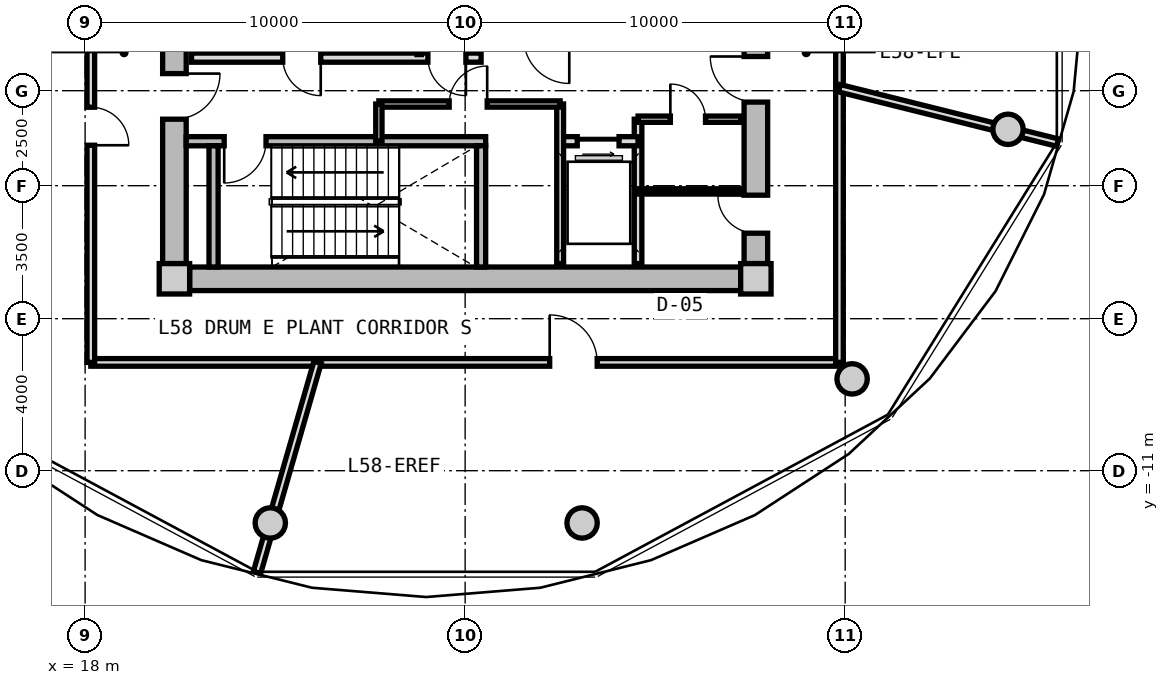
"""IFC4 building model, lengths in metres.
Left out: names, types, materials, properties, quantities, classifications, styles, units other than length and angle.
Written with IfcOpenShell. Run it as: python <this file> out.ifc"""

import sys

from ifc_helpers import new_model, si_unit, direction, frame, frame_2d, origin, origin_2d, place, context, subcontext, project, spatial, rectangle, circle, extrude, source, transform, mapped, element, fill, save


model = new_model("IFC4")
c1 = context("Model", 3, precision=1e-05, world=origin(), true_north=direction((0.0, 1.0)))
c2 = subcontext(c1, "Body", "Model", "MODEL_VIEW")
j1 = project(units=[si_unit("LENGTHUNIT", "METRE"), si_unit("PLANEANGLEUNIT", "RADIAN")], contexts=[c1])
p1 = place(None, origin())
s1 = spatial("IfcSite", under=j1, at=p1, CompositionType="ELEMENT")
p2 = place(p1, origin())
s2 = spatial("IfcBuilding", under=s1, at=p2, CompositionType="ELEMENT")
p3 = place(p2, frame((0.0, 0.0, 186.15)))
s3 = spatial("IfcBuildingStorey", under=s2, at=p3, CompositionType="ELEMENT", Elevation=186.15)
m1 = source(origin(), c2, "Body", "SweptSolid", [
    extrude(rectangle(XDim=0.8, YDim=0.8, at=origin_2d()), origin(), (0.0, 0.0, 1.0), 4.5),
])
for number, where, z_axis, x_axis in (
    (1, (20.35, -5.95, 0.0), (0.0, 0.0, 1.0), (1.0, 0.0, 0.0)),
    (2, (35.65, -5.95, 0.0), (0.0, 0.0, 1.0), (1.0, 0.0, 0.0)),
):
    element("IfcColumn", number, at=place(p3, frame(where, z_axis=z_axis, x_axis=x_axis)), inside=s3, PredefinedType="COLUMN", context=c2, shape_type="MappedRepresentation", body=[
        mapped(m1, transform((0.0, 0.0, 0.0), x_axis=(1.0, 0.0, 0.0), y_axis=(0.0, 1.0, 0.0), z_axis=(0.0, 0.0, 1.0), scale=1.0)),
    ])
m2 = source(origin(), c2, "Body", "SweptSolid", [
    extrude(rectangle(XDim=14.5, YDim=0.62, at=frame_2d((7.25, 0.0))), origin(), (0.0, 0.0, 1.0), 4.08),
])
p4 = place(p3, frame((35.25, -5.95, 0.0), z_axis=(0.0, 0.0, 1.0), x_axis=(-1.0, 0.0, 0.0)))
e3 = element("IfcWall", 3, at=p4, inside=s3, PredefinedType="SHEAR", context=c2, shape_type="MappedRepresentation", body=[
    mapped(m2, transform((0.0, 0.0, 0.0), x_axis=(1.0, 0.0, 0.0), y_axis=(0.0, 1.0, 0.0), z_axis=(0.0, 0.0, 1.0), scale=1.0)),
])
m3 = source(origin(), c2, "Body", "SweptSolid", [
    extrude(rectangle(XDim=11.1, YDim=0.62, at=frame_2d((5.55, 0.0))), origin(), (0.0, 0.0, 1.0), 4.08),
])
p5 = place(p3, frame((20.35, -5.55, 0.0), z_axis=(0.0, 0.0, 1.0), x_axis=(0.0, 1.0, 0.0)))
e4 = element("IfcWall", 4, at=p5, inside=s3, PredefinedType="SHEAR", context=c2, shape_type="MappedRepresentation", body=[
    mapped(m3, transform((0.0, 0.0, 0.0), x_axis=(1.0, 0.0, 0.0), y_axis=(0.0, 1.0, 0.0), z_axis=(0.0, 0.0, 1.0), scale=1.0)),
])
p6 = place(p5, frame((3.8, 0.0, 0.0)))
e5 = element("IfcOpeningElement", 5, at=p6, cuts=e4, PredefinedType="OPENING", context=c2, shape_type="SweptSolid", body=[
    extrude(rectangle(XDim=1.2, YDim=2.15, at=frame_2d((0.6, 1.075))), frame((0.0, 0.32, 0.0), z_axis=(0.0, -1.0, 0.0), x_axis=(1.0, 0.0, 0.0)), (0.0, 0.0, 1.0), 0.64),
])
p7 = place(p3, frame((35.65, 5.55, 0.0), z_axis=(0.0, 0.0, 1.0), x_axis=(0.0, -1.0, 0.0)))
e6 = element("IfcWall", 6, at=p7, inside=s3, PredefinedType="SHEAR", context=c2, shape_type="MappedRepresentation", body=[
    mapped(m3, transform((0.0, 0.0, 0.0), x_axis=(1.0, 0.0, 0.0), y_axis=(0.0, 1.0, 0.0), z_axis=(0.0, 0.0, 1.0), scale=1.0)),
])
p8 = place(p7, frame((5.65, 0.0, 0.0)))
e7 = element("IfcOpeningElement", 7, at=p8, cuts=e6, PredefinedType="OPENING", context=c2, shape_type="SweptSolid", body=[
    extrude(rectangle(XDim=1.2, YDim=2.15, at=frame_2d((0.6, 1.075))), frame((0.0, 0.32, 0.0), z_axis=(0.0, -1.0, 0.0), x_axis=(1.0, 0.0, 0.0)), (0.0, 0.0, 1.0), 0.64),
])
p9 = place(p7, frame((9.3, 0.0, 0.0)))
e8 = element("IfcOpeningElement", 8, at=p9, cuts=e6, PredefinedType="OPENING", context=c2, shape_type="SweptSolid", body=[
    extrude(rectangle(XDim=1.0, YDim=2.1, at=frame_2d((0.5, 1.05))), frame((0.0, 0.32, 0.0), z_axis=(0.0, -1.0, 0.0), x_axis=(1.0, 0.0, 0.0)), (0.0, 0.0, 1.0), 0.64),
])
m4 = source(origin(), c2, "Body", "SweptSolid", [
    extrude(circle(Radius=0.4, at=origin_2d()), origin(), (0.0, 0.0, 1.0), 4.08),
])
for number, where, z_axis, x_axis in (
    (9, (22.873, -12.375, 0.0), (0.0, 0.0, 1.0), (1.0, 0.0, 0.0)),
    (10, (31.077, -12.375, 0.0), (0.0, 0.0, 1.0), (1.0, 0.0, 0.0)),
    (11, (38.183, -8.584, 0.0), (0.0, 0.0, 1.0), (1.0, 0.0, 0.0)),
    (12, (42.285, -2.016, 0.0), (0.0, 0.0, 1.0), (1.0, 0.0, 0.0)),
):
    element("IfcColumn", number, at=place(p3, frame(where, z_axis=z_axis, x_axis=x_axis)), inside=s3, PredefinedType="COLUMN", context=c2, shape_type="MappedRepresentation", body=[
        mapped(m4, transform((0.0, 0.0, 0.0), x_axis=(1.0, 0.0, 0.0), y_axis=(0.0, 1.0, 0.0), z_axis=(0.0, 0.0, 1.0), scale=1.0)),
    ])
m5 = source(origin(), c2, "Body", "SweptSolid", [
    extrude(rectangle(XDim=7.88, YDim=0.24, at=frame_2d((3.94, 0.0))), origin(), (0.0, 0.0, 1.0), 4.08),
])
p10 = place(p3, frame((20.66, -2.33, 0.0), z_axis=(0.0, 0.0, 1.0), x_axis=(1.0, 0.0, 0.0)))
e13 = element("IfcWall", 13, at=p10, inside=s3, PredefinedType="PARTITIONING", context=c2, shape_type="MappedRepresentation", body=[
    mapped(m5, transform((0.0, 0.0, 0.0), x_axis=(1.0, 0.0, 0.0), y_axis=(0.0, 1.0, 0.0), z_axis=(0.0, 0.0, 1.0), scale=1.0)),
])
p11 = place(p10, frame((1.0, 0.0, 0.0)))
e14 = element("IfcOpeningElement", 14, at=p11, cuts=e13, PredefinedType="OPENING", context=c2, shape_type="SweptSolid", body=[
    extrude(rectangle(XDim=1.1, YDim=2.15, at=frame_2d((0.55, 1.075))), frame((0.0, 0.13, 0.0), z_axis=(0.0, -1.0, 0.0), x_axis=(1.0, 0.0, 0.0)), (0.0, 0.0, 1.0), 0.26),
])
m6 = source(origin(), c2, "Body", "SweptSolid", [
    extrude(rectangle(XDim=3.19, YDim=0.24, at=frame_2d((1.595, 0.0))), origin(), (0.0, 0.0, 1.0), 4.08),
])
for number, where, z_axis, x_axis in (
    (15, (21.38, -5.64, 0.0), (0.0, 0.0, 1.0), (0.0, 1.0, 0.0)),
    (16, (28.42, -5.64, 0.0), (0.0, 0.0, 1.0), (0.0, 1.0, 0.0)),
):
    element("IfcWall", number, at=place(p3, frame(where, z_axis=z_axis, x_axis=x_axis)), inside=s3, PredefinedType="PARTITIONING", context=c2, shape_type="MappedRepresentation", body=[
        mapped(m6, transform((0.0, 0.0, 0.0), x_axis=(1.0, 0.0, 0.0), y_axis=(0.0, 1.0, 0.0), z_axis=(0.0, 0.0, 1.0), scale=1.0)),
    ])
m7 = source(origin(), c2, "Body", "SweptSolid", [
    extrude(rectangle(XDim=7.62, YDim=0.24, at=frame_2d((3.81, 0.0))), origin(), (0.0, 0.0, 1.0), 4.065),
])
p12 = place(p3, frame((20.8, -0.13, 0.0), z_axis=(0.0, 0.0, 1.0), x_axis=(1.0, 0.0, 0.0)))
e17 = element("IfcWall", 17, at=p12, inside=s3, PredefinedType="PARTITIONING", context=c2, shape_type="MappedRepresentation", body=[
    mapped(m7, transform((0.0, 0.0, 0.0), x_axis=(1.0, 0.0, 0.0), y_axis=(0.0, 1.0, 0.0), z_axis=(0.0, 0.0, 1.0), scale=1.0)),
])
p13 = place(p12, frame((6.22, 0.0, 0.0)))
e18 = element("IfcOpeningElement", 18, at=p13, cuts=e17, PredefinedType="OPENING", context=c2, shape_type="SweptSolid", body=[
    extrude(rectangle(XDim=1.0, YDim=2.1, at=frame_2d((0.5, 1.05))), frame((0.0, 0.13, 0.0), z_axis=(0.0, -1.0, 0.0), x_axis=(1.0, 0.0, 0.0)), (0.0, 0.0, 1.0), 0.26),
])
p14 = place(p12, frame((2.4, 0.0, 0.0)))
e19 = element("IfcOpeningElement", 19, at=p14, cuts=e17, PredefinedType="OPENING", context=c2, shape_type="SweptSolid", body=[
    extrude(rectangle(XDim=1.0, YDim=2.1, at=frame_2d((0.5, 1.05))), frame((0.0, 0.13, 0.0), z_axis=(0.0, -1.0, 0.0), x_axis=(1.0, 0.0, 0.0)), (0.0, 0.0, 1.0), 0.26),
])
m8 = source(origin(), c2, "Body", "SweptSolid", [
    extrude(rectangle(XDim=2.33, YDim=0.115, at=frame_2d((1.165, 0.0))), origin(), (0.0, 0.0, 1.0), 4.065),
])
p15 = place(p3, frame((26.79, -0.05, 0.0), z_axis=(0.0, 0.0, 1.0), x_axis=(0.0, 1.0, 0.0)))
e20 = element("IfcWall", 20, at=p15, inside=s3, PredefinedType="PARTITIONING", context=c2, shape_type="MappedRepresentation", body=[
    mapped(m8, transform((0.0, 0.0, 0.0), x_axis=(1.0, 0.0, 0.0), y_axis=(0.0, 1.0, 0.0), z_axis=(0.0, 0.0, 1.0), scale=1.0)),
])
m9 = source(origin(), c2, "Body", "SweptSolid", [
    extrude(rectangle(XDim=3.8, YDim=0.2, at=frame_2d((1.9, 0.0))), origin(), (0.0, 0.0, 1.0), 4.065),
])
p16 = place(p3, frame((32.55, -5.55, 0.0), z_axis=(0.0, 0.0, 1.0), x_axis=(0.0, 1.0, 0.0)))
e21 = element("IfcWall", 21, at=p16, inside=s3, PredefinedType="PARTITIONING", context=c2, shape_type="MappedRepresentation", body=[
    mapped(m9, transform((0.0, 0.0, 0.0), x_axis=(1.0, 0.0, 0.0), y_axis=(0.0, 1.0, 0.0), z_axis=(0.0, 0.0, 1.0), scale=1.0)),
])
m10 = source(origin(), c2, "Body", "SweptSolid", [
    extrude(rectangle(XDim=2.05, YDim=0.24, at=frame_2d((1.025, 0.0))), origin(), (0.0, 0.0, 1.0), 4.065),
])
p17 = place(p3, frame((30.5, -2.33, 0.0), z_axis=(0.0, 0.0, 1.0), x_axis=(1.0, 0.0, 0.0)))
e22 = element("IfcWall", 22, at=p17, inside=s3, PredefinedType="PARTITIONING", context=c2, shape_type="MappedRepresentation", body=[
    mapped(m10, transform((0.0, 0.0, 0.0), x_axis=(1.0, 0.0, 0.0), y_axis=(0.0, 1.0, 0.0), z_axis=(0.0, 0.0, 1.0), scale=1.0)),
])
p18 = place(p17, frame((0.45, 0.0, 0.0)))
e23 = element("IfcOpeningElement", 23, at=p18, cuts=e22, PredefinedType="OPENING", context=c2, shape_type="SweptSolid", body=[
    extrude(rectangle(XDim=1.1, YDim=2.2, at=frame_2d((0.55, 1.1))), frame((0.0, 0.13, 0.0), z_axis=(0.0, -1.0, 0.0), x_axis=(1.0, 0.0, 0.0)), (0.0, 0.0, 1.0), 0.26),
])
m11 = source(origin(), c2, "Body", "SweptSolid", [
    extrude(rectangle(XDim=4.2, YDim=0.18, at=frame_2d((2.1, 0.0))), origin(), (0.0, 0.0, 1.0), 4.065),
])
p19 = place(p3, frame((30.5, -5.55, 0.0), z_axis=(0.0, 0.0, 1.0), x_axis=(0.0, 1.0, 0.0)))
e24 = element("IfcWall", 24, at=p19, inside=s3, PredefinedType="PARTITIONING", context=c2, shape_type="MappedRepresentation", body=[
    mapped(m11, transform((0.0, 0.0, 0.0), x_axis=(1.0, 0.0, 0.0), y_axis=(0.0, 1.0, 0.0), z_axis=(0.0, 0.0, 1.0), scale=1.0)),
])
m12 = source(origin(), c2, "Body", "SweptSolid", [
    extrude(rectangle(XDim=4.77, YDim=0.165, at=frame_2d((2.385, 0.0))), origin(), (0.0, 0.0, 1.0), 4.065),
])
p20 = place(p3, frame((25.73, -1.35, 0.0), z_axis=(0.0, 0.0, 1.0), x_axis=(1.0, 0.0, 0.0)))
e25 = element("IfcWall", 25, at=p20, inside=s3, PredefinedType="PARTITIONING", context=c2, shape_type="MappedRepresentation", body=[
    mapped(m12, transform((0.0, 0.0, 0.0), x_axis=(1.0, 0.0, 0.0), y_axis=(0.0, 1.0, 0.0), z_axis=(0.0, 0.0, 1.0), scale=1.0)),
])
p21 = place(p20, frame((1.85, 0.0, 0.0)))
e26 = element("IfcOpeningElement", 26, at=p21, cuts=e25, PredefinedType="OPENING", context=c2, shape_type="SweptSolid", body=[
    extrude(rectangle(XDim=1.0, YDim=2.1, at=frame_2d((0.5, 1.05))), frame((0.0, 0.093, 0.0), z_axis=(0.0, -1.0, 0.0), x_axis=(1.0, 0.0, 0.0)), (0.0, 0.0, 1.0), 0.185),
])
m13 = source(origin(), c2, "Body", "SweptSolid", [
    extrude(rectangle(XDim=0.98, YDim=0.165, at=frame_2d((0.49, 0.0))), origin(), (0.0, 0.0, 1.0), 4.065),
])
p22 = place(p3, frame((25.73, -2.33, 0.0), z_axis=(0.0, 0.0, 1.0), x_axis=(0.0, 1.0, 0.0)))
e27 = element("IfcWall", 27, at=p22, inside=s3, PredefinedType="PARTITIONING", context=c2, shape_type="MappedRepresentation", body=[
    mapped(m13, transform((0.0, 0.0, 0.0), x_axis=(1.0, 0.0, 0.0), y_axis=(0.0, 1.0, 0.0), z_axis=(0.0, 0.0, 1.0), scale=1.0)),
])
m14 = source(origin(), c2, "Body", "SweptSolid", [
    extrude(rectangle(XDim=2.7, YDim=0.165, at=frame_2d((1.35, 0.0))), origin(), (0.0, 0.0, 1.0), 4.065),
])
p23 = place(p3, frame((32.55, -1.75, 0.0), z_axis=(0.0, 0.0, 1.0), x_axis=(1.0, 0.0, 0.0)))
e28 = element("IfcWall", 28, at=p23, inside=s3, PredefinedType="PARTITIONING", context=c2, shape_type="MappedRepresentation", body=[
    mapped(m14, transform((0.0, 0.0, 0.0), x_axis=(1.0, 0.0, 0.0), y_axis=(0.0, 1.0, 0.0), z_axis=(0.0, 0.0, 1.0), scale=1.0)),
])
p24 = place(p23, frame((0.85, 0.0, 0.0)))
e29 = element("IfcOpeningElement", 29, at=p24, cuts=e28, PredefinedType="OPENING", context=c2, shape_type="SweptSolid", body=[
    extrude(rectangle(XDim=0.925, YDim=2.1, at=frame_2d((0.462, 1.05))), frame((0.0, 0.093, 0.0), z_axis=(0.0, -1.0, 0.0), x_axis=(1.0, 0.0, 0.0)), (0.0, 0.0, 1.0), 0.185),
])
m15 = source(origin(), c2, "Body", "SweptSolid", [
    extrude(rectangle(XDim=2.7, YDim=0.14, at=frame_2d((1.35, 0.0))), origin(), (0.0, 0.0, 1.0), 4.065),
])
p25 = place(p3, frame((32.55, -3.65, 0.0), z_axis=(0.0, 0.0, 1.0), x_axis=(1.0, 0.0, 0.0)))
e30 = element("IfcWall", 30, at=p25, inside=s3, PredefinedType="PARTITIONING", context=c2, shape_type="MappedRepresentation", body=[
    mapped(m15, transform((0.0, 0.0, 0.0), x_axis=(1.0, 0.0, 0.0), y_axis=(0.0, 1.0, 0.0), z_axis=(0.0, 0.0, 1.0), scale=1.0)),
])
m16 = source(origin(), c2, "Body", "SweptSolid", [
    extrude(rectangle(XDim=19.7, YDim=0.2, at=frame_2d((9.85, 0.0))), origin(), (0.0, 0.0, 1.0), 4.065),
])
p26 = place(p3, frame((37.85, -8.15, 0.0), z_axis=(0.0, 0.0, 1.0), x_axis=(-1.0, 0.0, 0.0)))
e31 = element("IfcWall", 31, at=p26, inside=s3, PredefinedType="PARTITIONING", context=c2, shape_type="MappedRepresentation", body=[
    mapped(m16, transform((0.0, 0.0, 0.0), x_axis=(1.0, 0.0, 0.0), y_axis=(0.0, 1.0, 0.0), z_axis=(0.0, 0.0, 1.0), scale=1.0)),
])
p27 = place(p26, frame((6.375, 0.0, 0.0)))
e32 = element("IfcOpeningElement", 32, at=p27, cuts=e31, PredefinedType="OPENING", context=c2, shape_type="SweptSolid", body=[
    extrude(rectangle(XDim=1.25, YDim=2.2, at=frame_2d((0.625, 1.1))), frame((0.0, 0.11, 0.0), z_axis=(0.0, -1.0, 0.0), x_axis=(1.0, 0.0, 0.0)), (0.0, 0.0, 1.0), 0.22),
])
m17 = source(origin(), c2, "Body", "SweptSolid", [
    extrude(rectangle(XDim=16.3, YDim=0.2, at=frame_2d((8.15, 0.0))), origin(), (0.0, 0.0, 1.0), 4.065),
])
p28 = place(p3, frame((18.15, -8.15, 0.0), z_axis=(0.0, 0.0, 1.0), x_axis=(0.0, 1.0, 0.0)))
e33 = element("IfcWall", 33, at=p28, inside=s3, PredefinedType="PARTITIONING", context=c2, shape_type="MappedRepresentation", body=[
    mapped(m17, transform((0.0, 0.0, 0.0), x_axis=(1.0, 0.0, 0.0), y_axis=(0.0, 1.0, 0.0), z_axis=(0.0, 0.0, 1.0), scale=1.0)),
])
p29 = place(p28, frame((5.715, 0.0, 0.0)))
e34 = element("IfcOpeningElement", 34, at=p29, cuts=e33, PredefinedType="OPENING", context=c2, shape_type="SweptSolid", body=[
    extrude(rectangle(XDim=1.0, YDim=2.1, at=frame_2d((0.5, 1.05))), frame((0.0, 0.11, 0.0), z_axis=(0.0, -1.0, 0.0), x_axis=(1.0, 0.0, 0.0)), (0.0, 0.0, 1.0), 0.22),
])
p30 = place(p3, frame((37.85, 8.15, 0.0), z_axis=(0.0, 0.0, 1.0), x_axis=(0.0, -1.0, 0.0)))
e35 = element("IfcWall", 35, at=p30, inside=s3, PredefinedType="PARTITIONING", context=c2, shape_type="MappedRepresentation", body=[
    mapped(m17, transform((0.0, 0.0, 0.0), x_axis=(1.0, 0.0, 0.0), y_axis=(0.0, 1.0, 0.0), z_axis=(0.0, 0.0, 1.0), scale=1.0)),
])
p31 = place(p30, frame((4.197, 0.0, 0.0)))
e36 = element("IfcOpeningElement", 36, at=p31, cuts=e35, PredefinedType="OPENING", context=c2, shape_type="SweptSolid", body=[
    extrude(rectangle(XDim=1.0, YDim=2.1, at=frame_2d((0.5, 1.05))), frame((0.0, 0.11, 0.0), z_axis=(0.0, -1.0, 0.0), x_axis=(1.0, 0.0, 0.0)), (0.0, 0.0, 1.0), 0.22),
])
m18 = source(origin(), c2, "Body", "SweptSolid", [
    extrude(rectangle(XDim=5.754, YDim=0.2, at=frame_2d((2.877, 0.0))), origin(), (0.0, 0.0, 1.0), 4.065),
])
p32 = place(p3, frame((24.116, -8.15, 0.0), z_axis=(0.0, 0.0, 1.0), x_axis=(-0.276793809121, -0.960929335192, 0.0)))
e37 = element("IfcWall", 37, at=p32, inside=s3, PredefinedType="PARTITIONING", context=c2, shape_type="MappedRepresentation", body=[
    mapped(m18, transform((0.0, 0.0, 0.0), x_axis=(1.0, 0.0, 0.0), y_axis=(0.0, 1.0, 0.0), z_axis=(0.0, 0.0, 1.0), scale=1.0)),
])
m19 = source(origin(), c2, "Body", "SweptSolid", [
    extrude(rectangle(XDim=5.914, YDim=0.2, at=frame_2d((2.957, 0.0))), origin(), (0.0, 0.0, 1.0), 4.065),
])
p33 = place(p3, frame((37.85, -0.935, 0.0), z_axis=(0.0, 0.0, 1.0), x_axis=(0.970312235668, -0.241855670415, 0.0)))
e38 = element("IfcWall", 38, at=p33, inside=s3, PredefinedType="PARTITIONING", context=c2, shape_type="MappedRepresentation", body=[
    mapped(m19, transform((0.0, 0.0, 0.0), x_axis=(1.0, 0.0, 0.0), y_axis=(0.0, 1.0, 0.0), z_axis=(0.0, 0.0, 1.0), scale=1.0)),
])
m20 = source(origin(), c2, "Body", "SweptSolid", [
    extrude(rectangle(XDim=1.1, YDim=2.15, at=frame_2d((0.55, 1.075))), frame((0.0, 0.025, 0.0), z_axis=(0.0, -1.0, 0.0), x_axis=(1.0, 0.0, 0.0)), (0.0, 0.0, 1.0), 0.05),
])
p34 = place(p11, frame((1.1, 0.0, 0.0), z_axis=(0.0, 0.0, 1.0), x_axis=(-1.0, 0.0, 0.0)))
e39 = element("IfcDoor", 39, at=p34, inside=s3, OperationType="SINGLE_SWING_RIGHT", PredefinedType="DOOR", context=c2, shape_type="MappedRepresentation", body=[
    mapped(m20, transform((0.0, 0.0, 0.0), x_axis=(1.0, 0.0, 0.0), y_axis=(0.0, 1.0, 0.0), z_axis=(0.0, 0.0, 1.0), scale=1.0)),
])
fill(e14, e39)
m21 = source(origin(), c2, "Body", "SweptSolid", [
    extrude(rectangle(XDim=1.2, YDim=2.15, at=frame_2d((0.6, 1.075))), frame((0.0, 0.025, 0.0), z_axis=(0.0, -1.0, 0.0), x_axis=(1.0, 0.0, 0.0)), (0.0, 0.0, 1.0), 0.05),
])
p35 = place(p6, frame((1.2, 0.0, 0.0), z_axis=(0.0, 0.0, 1.0), x_axis=(-1.0, 0.0, 0.0)))
e40 = element("IfcDoor", 40, at=p35, inside=s3, OperationType="SINGLE_SWING_LEFT", PredefinedType="DOOR", context=c2, shape_type="MappedRepresentation", body=[
    mapped(m21, transform((0.0, 0.0, 0.0), x_axis=(1.0, 0.0, 0.0), y_axis=(0.0, 1.0, 0.0), z_axis=(0.0, 0.0, 1.0), scale=1.0)),
])
fill(e5, e40)
p36 = place(p8, frame((1.2, 0.0, 0.0), z_axis=(0.0, 0.0, 1.0), x_axis=(-1.0, 0.0, 0.0)))
e41 = element("IfcDoor", 41, at=p36, inside=s3, OperationType="SINGLE_SWING_RIGHT", PredefinedType="DOOR", context=c2, shape_type="MappedRepresentation", body=[
    mapped(m21, transform((0.0, 0.0, 0.0), x_axis=(1.0, 0.0, 0.0), y_axis=(0.0, 1.0, 0.0), z_axis=(0.0, 0.0, 1.0), scale=1.0)),
])
fill(e7, e41)
m22 = source(origin(), c2, "Body", "SweptSolid", [
    extrude(rectangle(XDim=1.0, YDim=2.1, at=frame_2d((0.5, 1.05))), frame((0.0, 0.025, 0.0), z_axis=(0.0, -1.0, 0.0), x_axis=(1.0, 0.0, 0.0)), (0.0, 0.0, 1.0), 0.05),
])
p37 = place(p13, frame((1.0, 0.0, 0.0), z_axis=(0.0, 0.0, 1.0), x_axis=(-1.0, 0.0, 0.0)))
e42 = element("IfcDoor", 42, at=p37, inside=s3, OperationType="SINGLE_SWING_LEFT", PredefinedType="DOOR", context=c2, shape_type="MappedRepresentation", body=[
    mapped(m22, transform((0.0, 0.0, 0.0), x_axis=(1.0, 0.0, 0.0), y_axis=(0.0, 1.0, 0.0), z_axis=(0.0, 0.0, 1.0), scale=1.0)),
])
fill(e18, e42)
p38 = place(p14, frame((1.0, 0.0, 0.0), z_axis=(0.0, 0.0, 1.0), x_axis=(-1.0, 0.0, 0.0)))
e43 = element("IfcDoor", 43, at=p38, inside=s3, OperationType="SINGLE_SWING_LEFT", PredefinedType="DOOR", context=c2, shape_type="MappedRepresentation", body=[
    mapped(m22, transform((0.0, 0.0, 0.0), x_axis=(1.0, 0.0, 0.0), y_axis=(0.0, 1.0, 0.0), z_axis=(0.0, 0.0, 1.0), scale=1.0)),
])
fill(e19, e43)
m23 = source(origin(), c2, "Body", "SweptSolid", [
    extrude(rectangle(XDim=1.1, YDim=2.2, at=frame_2d((0.55, 1.1))), frame((0.0, 0.025, 0.0), z_axis=(0.0, -1.0, 0.0), x_axis=(1.0, 0.0, 0.0)), (0.0, 0.0, 1.0), 0.05),
])
p39 = place(p18, frame((1.1, 0.0, 0.0), z_axis=(0.0, 0.0, 1.0), x_axis=(-1.0, 0.0, 0.0)))
e44 = element("IfcDoor", 44, at=p39, inside=s3, OperationType="SLIDING_TO_RIGHT", PredefinedType="DOOR", context=c2, shape_type="MappedRepresentation", body=[
    mapped(m23, transform((0.0, 0.0, 0.0), x_axis=(1.0, 0.0, 0.0), y_axis=(0.0, 1.0, 0.0), z_axis=(0.0, 0.0, 1.0), scale=1.0)),
])
fill(e23, e44)
p40 = place(p21, origin())
e45 = element("IfcDoor", 45, at=p40, inside=s3, OperationType="SINGLE_SWING_RIGHT", PredefinedType="DOOR", context=c2, shape_type="MappedRepresentation", body=[
    mapped(m22, transform((0.0, 0.0, 0.0), x_axis=(1.0, 0.0, 0.0), y_axis=(0.0, 1.0, 0.0), z_axis=(0.0, 0.0, 1.0), scale=1.0)),
])
fill(e26, e45)
m24 = source(origin(), c2, "Body", "SweptSolid", [
    extrude(rectangle(XDim=0.925, YDim=2.1, at=frame_2d((0.462, 1.05))), frame((0.0, 0.025, 0.0), z_axis=(0.0, -1.0, 0.0), x_axis=(1.0, 0.0, 0.0)), (0.0, 0.0, 1.0), 0.05),
])
p41 = place(p24, origin())
e46 = element("IfcDoor", 46, at=p41, inside=s3, OperationType="SINGLE_SWING_LEFT", PredefinedType="DOOR", context=c2, shape_type="MappedRepresentation", body=[
    mapped(m24, transform((0.0, 0.0, 0.0), x_axis=(1.0, 0.0, 0.0), y_axis=(0.0, 1.0, 0.0), z_axis=(0.0, 0.0, 1.0), scale=1.0)),
])
fill(e29, e46)
p42 = place(p9, frame((1.0, 0.0, 0.0), z_axis=(0.0, 0.0, 1.0), x_axis=(-1.0, 0.0, 0.0)))
e47 = element("IfcDoor", 47, at=p42, inside=s3, OperationType="SINGLE_SWING_RIGHT", PredefinedType="DOOR", context=c2, shape_type="MappedRepresentation", body=[
    mapped(m22, transform((0.0, 0.0, 0.0), x_axis=(1.0, 0.0, 0.0), y_axis=(0.0, 1.0, 0.0), z_axis=(0.0, 0.0, 1.0), scale=1.0)),
])
fill(e8, e47)
m25 = source(origin(), c2, "Body", "SweptSolid", [
    extrude(rectangle(XDim=1.25, YDim=2.2, at=frame_2d((0.625, 1.1))), frame((0.0, 0.025, 0.0), z_axis=(0.0, -1.0, 0.0), x_axis=(1.0, 0.0, 0.0)), (0.0, 0.0, 1.0), 0.05),
])
p43 = place(p27, frame((1.25, 0.0, 0.0), z_axis=(0.0, 0.0, 1.0), x_axis=(-1.0, 0.0, 0.0)))
e48 = element("IfcDoor", 48, at=p43, inside=s3, OperationType="SINGLE_SWING_LEFT", PredefinedType="DOOR", context=c2, shape_type="MappedRepresentation", body=[
    mapped(m25, transform((0.0, 0.0, 0.0), x_axis=(1.0, 0.0, 0.0), y_axis=(0.0, 1.0, 0.0), z_axis=(0.0, 0.0, 1.0), scale=1.0)),
])
fill(e32, e48)
p44 = place(p29, frame((1.0, 0.0, 0.0), z_axis=(0.0, 0.0, 1.0), x_axis=(-1.0, 0.0, 0.0)))
e49 = element("IfcDoor", 49, at=p44, inside=s3, OperationType="SINGLE_SWING_RIGHT", PredefinedType="DOOR", context=c2, shape_type="MappedRepresentation", body=[
    mapped(m22, transform((0.0, 0.0, 0.0), x_axis=(1.0, 0.0, 0.0), y_axis=(0.0, 1.0, 0.0), z_axis=(0.0, 0.0, 1.0), scale=1.0)),
])
fill(e34, e49)
save(model, sys.argv[1])
